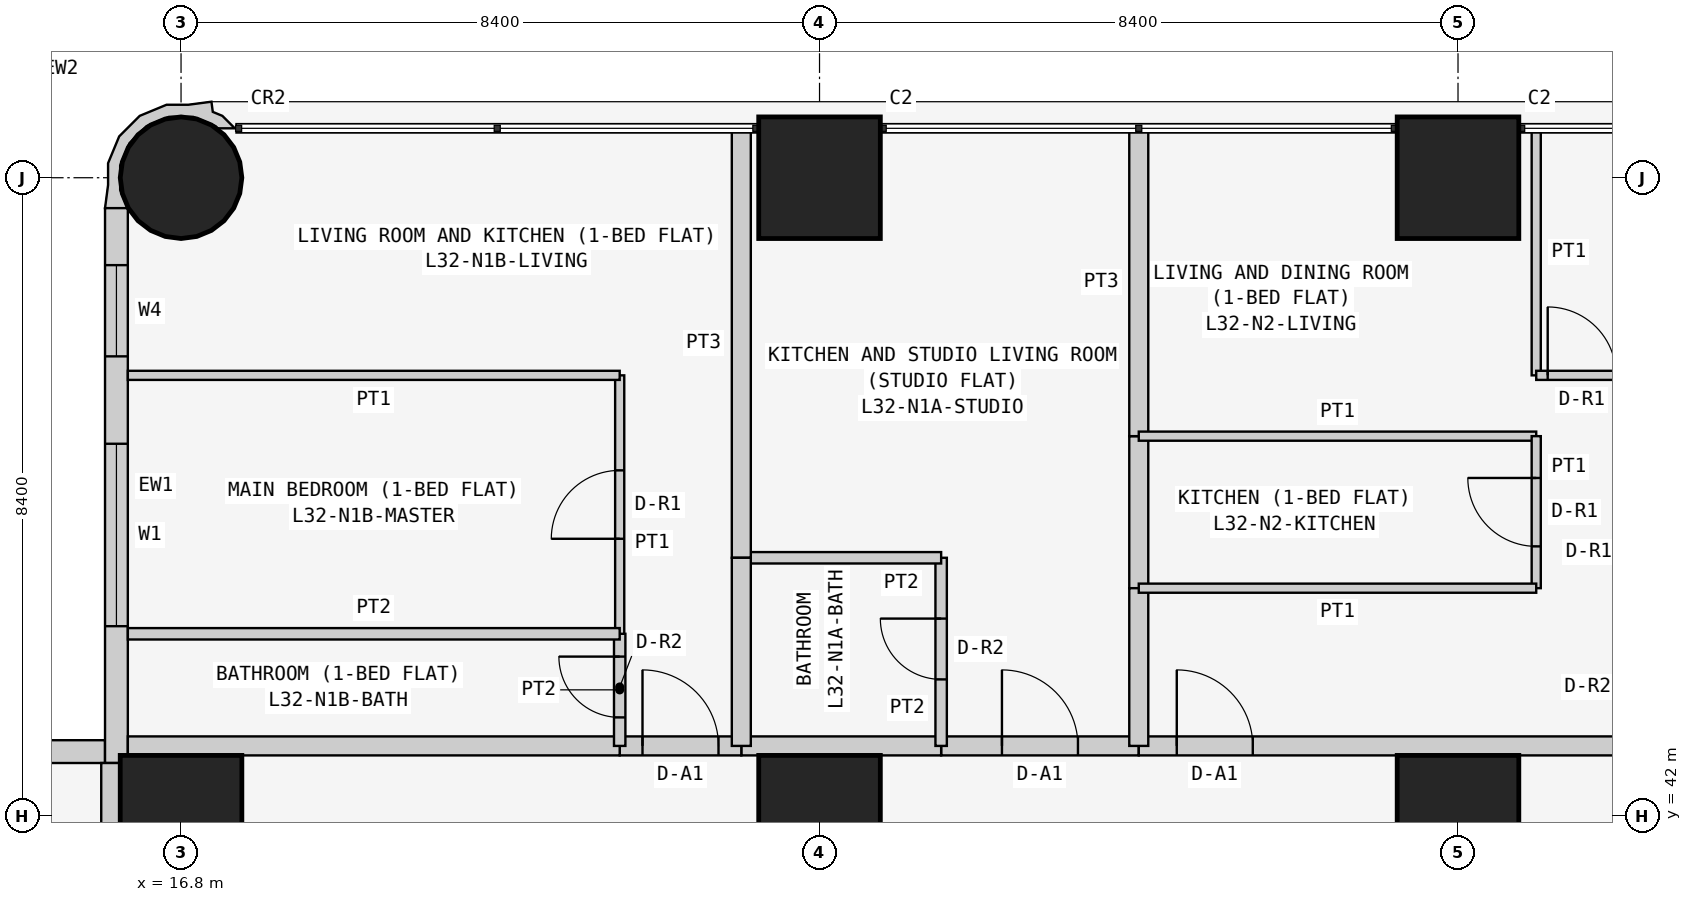
"""IFC4 building model, lengths in metres.
Left out: names, types, materials, properties, quantities, classifications, styles, units other than length and angle.
Written with IfcOpenShell. Run it as: python <this file> out.ifc"""

import sys

from ifc_helpers import new_model, si_unit, direction, frame, frame_2d, origin, origin_2d, place, context, subcontext, project, spatial, polyline, rectangle, circle, outline, extrude, element, fill, save


model = new_model("IFC4")
c1 = context("Model", 3, precision=1e-05, world=origin(), true_north=direction((0.0, 1.0)))
c2 = subcontext(c1, "Body", "Model", "MODEL_VIEW")
j1 = project(units=[si_unit("LENGTHUNIT", "METRE"), si_unit("PLANEANGLEUNIT", "RADIAN")], contexts=[c1])
p1 = place(None, origin())
s1 = spatial("IfcSite", under=j1, at=p1, CompositionType="ELEMENT")
p2 = place(p1, origin())
s2 = spatial("IfcBuilding", under=s1, at=p2, CompositionType="ELEMENT")
p3 = place(p2, frame((0.0, 0.0, 126.9)))
s3 = spatial("IfcBuildingStorey", under=s2, at=p3, CompositionType="ELEMENT", Elevation=126.9)
p4 = place(p3, frame((16.8, 42.0, 0.0), z_axis=(0.0, 0.0, 1.0), x_axis=(1.0, 0.0, 0.0)))
e1 = element("IfcColumn", 1, at=p4, inside=s3, PredefinedType="COLUMN", context=c2, shape_type="SweptSolid", body=[
    extrude(rectangle(XDim=1.6, YDim=1.6, at=origin_2d()), origin(), (0.0, 0.0, 1.0), 3.6),
])
p5 = place(p3, frame((16.8, 50.4, 0.0), z_axis=(0.0, 0.0, 1.0), x_axis=(1.0, 0.0, 0.0)))
e2 = element("IfcColumn", 2, at=p5, inside=s3, PredefinedType="COLUMN", context=c2, shape_type="SweptSolid", body=[
    extrude(circle(Radius=0.8, at=origin_2d()), origin(), (0.0, 0.0, 1.0), 3.6),
])
for number, where, z_axis, x_axis in (
    (3, (25.2, 42.0, 0.0), (0.0, 0.0, 1.0), (1.0, 0.0, 0.0)),
    (4, (25.2, 50.4, 0.0), (0.0, 0.0, 1.0), (1.0, 0.0, 0.0)),
    (5, (33.6, 42.0, 0.0), (0.0, 0.0, 1.0), (1.0, 0.0, 0.0)),
    (6, (33.6, 50.4, 0.0), (0.0, 0.0, 1.0), (1.0, 0.0, 0.0)),
):
    element("IfcColumn", number, at=place(p3, frame(where, z_axis=z_axis, x_axis=x_axis)), inside=s3, PredefinedType="COLUMN", context=c2, shape_type="SweptSolid", body=[
        extrude(rectangle(XDim=1.6, YDim=1.6, at=origin_2d()), origin(), (0.0, 0.0, 1.0), 3.6),
    ])
p6 = place(p3, frame((15.8, 42.85, 0.0), z_axis=(0.0, 0.0, 1.0), x_axis=(-1.0, 0.0, 0.0)))
e7 = element("IfcWall", 7, at=p6, inside=s3, PredefinedType="SOLIDWALL", context=c2, shape_type="SweptSolid", body=[
    extrude(rectangle(XDim=15.4, YDim=0.3, at=frame_2d((7.7, 0.0))), origin(), (0.0, 0.0, 1.0), 3.45),
])
p7 = place(p6, frame((1.2, 0.0, 0.9)))
e8 = element("IfcOpeningElement", 8, at=p7, cuts=e7, PredefinedType="OPENING", context=c2, shape_type="SweptSolid", body=[
    extrude(rectangle(XDim=1.8, YDim=1.5, at=frame_2d((0.9, 0.75))), frame((0.0, 0.16, 0.0), z_axis=(0.0, -1.0, 0.0), x_axis=(1.0, 0.0, 0.0)), (0.0, 0.0, 1.0), 0.32),
])
p8 = place(p6, frame((4.95, 0.0, 1.5)))
e9 = element("IfcOpeningElement", 9, at=p8, cuts=e7, PredefinedType="OPENING", context=c2, shape_type="SweptSolid", body=[
    extrude(rectangle(XDim=0.9, YDim=0.7, at=frame_2d((0.45, 0.35))), frame((0.0, 0.16, 0.0), z_axis=(0.0, -1.0, 0.0), x_axis=(1.0, 0.0, 0.0)), (0.0, 0.0, 1.0), 0.32),
])
p9 = place(p6, frame((8.5, 0.0, 0.9)))
e10 = element("IfcOpeningElement", 10, at=p9, cuts=e7, PredefinedType="OPENING", context=c2, shape_type="SweptSolid", body=[
    extrude(rectangle(XDim=1.8, YDim=1.5, at=frame_2d((0.9, 0.75))), frame((0.0, 0.16, 0.0), z_axis=(0.0, -1.0, 0.0), x_axis=(1.0, 0.0, 0.0)), (0.0, 0.0, 1.0), 0.32),
])
p10 = place(p6, frame((12.5, 0.0, 0.0)))
e11 = element("IfcOpeningElement", 11, at=p10, cuts=e7, PredefinedType="OPENING", context=c2, shape_type="SweptSolid", body=[
    extrude(rectangle(XDim=0.9, YDim=2.4, at=frame_2d((0.45, 1.2))), frame((0.0, 0.16, 0.0), z_axis=(0.0, -1.0, 0.0), x_axis=(1.0, 0.0, 0.0)), (0.0, 0.0, 1.0), 0.32),
])
p11 = place(p6, frame((13.5, 0.0, 0.9)))
e12 = element("IfcOpeningElement", 12, at=p11, cuts=e7, PredefinedType="OPENING", context=c2, shape_type="SweptSolid", body=[
    extrude(rectangle(XDim=1.2, YDim=1.5, at=frame_2d((0.6, 0.75))), frame((0.0, 0.16, 0.0), z_axis=(0.0, -1.0, 0.0), x_axis=(1.0, 0.0, 0.0)), (0.0, 0.0, 1.0), 0.32),
])
p12 = place(p3, frame((15.95, 50.0, 0.0), z_axis=(0.0, 0.0, 1.0), x_axis=(0.0, -1.0, 0.0)))
e13 = element("IfcWall", 13, at=p12, inside=s3, PredefinedType="SOLIDWALL", context=c2, shape_type="SweptSolid", body=[
    extrude(rectangle(XDim=7.3, YDim=0.3, at=frame_2d((3.65, 0.0))), origin(), (0.0, 0.0, 1.0), 3.45),
])
p13 = place(p12, frame((3.1, 0.0, 0.9)))
e14 = element("IfcOpeningElement", 14, at=p13, cuts=e13, PredefinedType="OPENING", context=c2, shape_type="SweptSolid", body=[
    extrude(rectangle(XDim=2.4, YDim=1.5, at=frame_2d((1.2, 0.75))), frame((0.0, 0.16, 0.0), z_axis=(0.0, -1.0, 0.0), x_axis=(1.0, 0.0, 0.0)), (0.0, 0.0, 1.0), 0.32),
])
p14 = place(p12, frame((0.75, 0.0, 0.9)))
e15 = element("IfcOpeningElement", 15, at=p14, cuts=e13, PredefinedType="OPENING", context=c2, shape_type="SweptSolid", body=[
    extrude(rectangle(XDim=1.2, YDim=1.5, at=frame_2d((0.6, 0.75))), frame((0.0, 0.16, 0.0), z_axis=(0.0, -1.0, 0.0), x_axis=(1.0, 0.0, 0.0)), (0.0, 0.0, 1.0), 0.32),
])
p15 = place(p3, frame((17.448, 50.995, 0.0), z_axis=(0.0, 0.0, 1.0), x_axis=(-0.343276641956, 0.93923434088, 0.0)))
e16 = element("IfcWall", 16, at=p15, inside=s3, PredefinedType="SOLIDWALL", context=c2, shape_type="SweptSolid", body=[
    extrude(outline(polyline([(0.241, 0.023), (0.333, 0.124), (0.465, 0.094), (0.532, 0.393), (0.631, 0.663), (0.614, 1.045), (0.454, 1.391), (0.172, 1.649), (-0.098, 1.748), (-0.369, 1.89), (-0.509, 1.621), (-0.491, 1.615), (-0.479, 1.609), (-0.211, 1.62), (0.088, 1.511), (0.323, 1.295), (0.457, 1.006), (0.47, 0.688), (0.361, 0.389), (0.145, 0.154), (0.108, 0.137), (0.031, -0.075), (0.241, 0.023)])), origin(), (0.0, 0.0, 1.0), 3.45),
])
p16 = place(p3, frame((26.8, 42.925, 0.0), z_axis=(0.0, 0.0, 1.0), x_axis=(1.0, 0.0, 0.0)))
e17 = element("IfcWall", 17, at=p16, inside=s3, PredefinedType="PARTITIONING", context=c2, shape_type="SweptSolid", body=[
    extrude(rectangle(XDim=2.6, YDim=0.25, at=frame_2d((1.3, 0.0))), origin(), (0.0, 0.0, 1.0), 3.45),
])
p17 = place(p16, frame((0.8, 0.0, 0.0)))
e18 = element("IfcOpeningElement", 18, at=p17, cuts=e17, PredefinedType="OPENING", context=c2, shape_type="SweptSolid", body=[
    extrude(rectangle(XDim=1.0, YDim=2.1, at=frame_2d((0.5, 1.05))), frame((0.0, 0.135, 0.0), z_axis=(0.0, -1.0, 0.0), x_axis=(1.0, 0.0, 0.0)), (0.0, 0.0, 1.0), 0.27),
])
p18 = place(p3, frame((24.171, 42.925, 0.0), z_axis=(0.0, 0.0, 1.0), x_axis=(1.0, 0.0, 0.0)))
e19 = element("IfcWall", 19, at=p18, inside=s3, PredefinedType="PARTITIONING", context=c2, shape_type="SweptSolid", body=[
    extrude(rectangle(XDim=2.629, YDim=0.25, at=frame_2d((1.314, 0.0))), origin(), (0.0, 0.0, 1.0), 3.45),
])
p19 = place(p3, frame((22.571, 42.925, 0.0), z_axis=(0.0, 0.0, 1.0), x_axis=(1.0, 0.0, 0.0)))
e20 = element("IfcWall", 20, at=p19, inside=s3, PredefinedType="PARTITIONING", context=c2, shape_type="SweptSolid", body=[
    extrude(rectangle(XDim=1.6, YDim=0.25, at=frame_2d((0.8, 0.0))), origin(), (0.0, 0.0, 1.0), 3.45),
])
p20 = place(p19, frame((0.3, 0.0, 0.0)))
e21 = element("IfcOpeningElement", 21, at=p20, cuts=e20, PredefinedType="OPENING", context=c2, shape_type="SweptSolid", body=[
    extrude(rectangle(XDim=1.0, YDim=2.1, at=frame_2d((0.5, 1.05))), frame((0.0, 0.135, 0.0), z_axis=(0.0, -1.0, 0.0), x_axis=(1.0, 0.0, 0.0)), (0.0, 0.0, 1.0), 0.27),
])
p21 = place(p3, frame((16.1, 42.925, 0.0), z_axis=(0.0, 0.0, 1.0), x_axis=(1.0, 0.0, 0.0)))
e22 = element("IfcWall", 22, at=p21, inside=s3, PredefinedType="PARTITIONING", context=c2, shape_type="SweptSolid", body=[
    extrude(rectangle(XDim=6.471, YDim=0.25, at=frame_2d((3.235, 0.0))), origin(), (0.0, 0.0, 1.0), 3.45),
])
p22 = place(p3, frame((29.4, 42.925, 0.0), z_axis=(0.0, 0.0, 1.0), x_axis=(1.0, 0.0, 0.0)))
e23 = element("IfcWall", 23, at=p22, inside=s3, PredefinedType="PARTITIONING", context=c2, shape_type="SweptSolid", body=[
    extrude(rectangle(XDim=6.429, YDim=0.25, at=frame_2d((3.215, 0.0))), origin(), (0.0, 0.0, 1.0), 3.45),
])
p23 = place(p22, frame((0.5, 0.0, 0.0)))
e24 = element("IfcOpeningElement", 24, at=p23, cuts=e23, PredefinedType="OPENING", context=c2, shape_type="SweptSolid", body=[
    extrude(rectangle(XDim=1.0, YDim=2.1, at=frame_2d((0.5, 1.05))), frame((0.0, 0.135, 0.0), z_axis=(0.0, -1.0, 0.0), x_axis=(1.0, 0.0, 0.0)), (0.0, 0.0, 1.0), 0.27),
])
p24 = place(p3, frame((15.875, 36.229, 0.0), z_axis=(0.0, 0.0, 1.0), x_axis=(0.0, 1.0, 0.0)))
e25 = element("IfcWall", 25, at=p24, inside=s3, PredefinedType="PARTITIONING", context=c2, shape_type="SweptSolid", body=[
    extrude(rectangle(XDim=6.471, YDim=0.25, at=frame_2d((3.235, 0.0))), origin(), (0.0, 0.0, 1.0), 3.45),
])
p25 = place(p3, frame((26.8, 42.925, 0.0), z_axis=(0.0, 0.0, 1.0), x_axis=(0.0, 1.0, 0.0)))
e26 = element("IfcWall", 26, at=p25, inside=s3, PredefinedType="PARTITIONING", context=c2, shape_type="SweptSolid", body=[
    extrude(rectangle(XDim=2.475, YDim=0.15, at=frame_2d((1.237, 0.0))), origin(), (0.0, 0.0, 1.0), 3.45),
])
p26 = place(p25, frame((0.875, 0.0, 0.0)))
e27 = element("IfcOpeningElement", 27, at=p26, cuts=e26, PredefinedType="OPENING", context=c2, shape_type="SweptSolid", body=[
    extrude(rectangle(XDim=0.8, YDim=2.1, at=frame_2d((0.4, 1.05))), frame((0.0, 0.085, 0.0), z_axis=(0.0, -1.0, 0.0), x_axis=(1.0, 0.0, 0.0)), (0.0, 0.0, 1.0), 0.17),
])
p27 = place(p3, frame((26.8, 45.4, 0.0), z_axis=(0.0, 0.0, 1.0), x_axis=(-1.0, 0.0, 0.0)))
e28 = element("IfcWall", 28, at=p27, inside=s3, PredefinedType="PARTITIONING", context=c2, shape_type="SweptSolid", body=[
    extrude(rectangle(XDim=2.629, YDim=0.15, at=frame_2d((1.314, 0.0))), origin(), (0.0, 0.0, 1.0), 3.45),
])
p28 = place(p3, frame((24.171, 45.4, 0.0), z_axis=(0.0, 0.0, 1.0), x_axis=(0.0, 1.0, 0.0)))
e29 = element("IfcWall", 29, at=p28, inside=s3, PredefinedType="PARTITIONING", context=c2, shape_type="SweptSolid", body=[
    extrude(rectangle(XDim=5.65, YDim=0.25, at=frame_2d((2.825, 0.0))), origin(), (0.0, 0.0, 1.0), 3.45),
])
p29 = place(p3, frame((29.4, 47.0, 0.0), z_axis=(0.0, 0.0, 1.0), x_axis=(0.0, -1.0, 0.0)))
e30 = element("IfcWall", 30, at=p29, inside=s3, PredefinedType="PARTITIONING", context=c2, shape_type="SweptSolid", body=[
    extrude(rectangle(XDim=2.0, YDim=0.25, at=frame_2d((1.0, 0.0))), origin(), (0.0, 0.0, 1.0), 2.848),
])
p30 = place(p3, frame((29.4, 45.0, 0.0), z_axis=(0.0, 0.0, 1.0), x_axis=(0.0, -1.0, 0.0)))
e31 = element("IfcWall", 31, at=p30, inside=s3, PredefinedType="PARTITIONING", context=c2, shape_type="SweptSolid", body=[
    extrude(rectangle(XDim=2.075, YDim=0.25, at=frame_2d((1.038, 0.0))), origin(), (0.0, 0.0, 1.0), 2.848),
])
p31 = place(p3, frame((29.4, 51.05, 0.0), z_axis=(0.0, 0.0, 1.0), x_axis=(0.0, -1.0, 0.0)))
e32 = element("IfcWall", 32, at=p31, inside=s3, PredefinedType="PARTITIONING", context=c2, shape_type="SweptSolid", body=[
    extrude(rectangle(XDim=4.05, YDim=0.25, at=frame_2d((2.025, 0.0))), origin(), (0.0, 0.0, 1.0), 2.848),
])
p32 = place(p3, frame((24.171, 45.4, 0.0), z_axis=(0.0, 0.0, 1.0), x_axis=(0.0, -1.0, 0.0)))
e33 = element("IfcWall", 33, at=p32, inside=s3, PredefinedType="PARTITIONING", context=c2, shape_type="SweptSolid", body=[
    extrude(rectangle(XDim=2.475, YDim=0.25, at=frame_2d((1.237, 0.0))), origin(), (0.0, 0.0, 1.0), 3.45),
])
p33 = place(p3, frame((22.571, 42.925, 0.0), z_axis=(0.0, 0.0, 1.0), x_axis=(0.0, 1.0, 0.0)))
e34 = element("IfcWall", 34, at=p33, inside=s3, PredefinedType="PARTITIONING", context=c2, shape_type="SweptSolid", body=[
    extrude(rectangle(XDim=1.475, YDim=0.15, at=frame_2d((0.737, 0.0))), origin(), (0.0, 0.0, 1.0), 3.45),
])
p34 = place(p33, frame((0.375, 0.0, 0.0)))
e35 = element("IfcOpeningElement", 35, at=p34, cuts=e34, PredefinedType="OPENING", context=c2, shape_type="SweptSolid", body=[
    extrude(rectangle(XDim=0.8, YDim=2.1, at=frame_2d((0.4, 1.05))), frame((0.0, 0.085, 0.0), z_axis=(0.0, -1.0, 0.0), x_axis=(1.0, 0.0, 0.0)), (0.0, 0.0, 1.0), 0.17),
])
p35 = place(p3, frame((22.571, 44.4, 0.0), z_axis=(0.0, 0.0, 1.0), x_axis=(0.0, 1.0, 0.0)))
e36 = element("IfcWall", 36, at=p35, inside=s3, PredefinedType="PARTITIONING", context=c2, shape_type="SweptSolid", body=[
    extrude(rectangle(XDim=3.4, YDim=0.12, at=frame_2d((1.7, 0.0))), origin(), (0.0, 0.0, 1.0), 3.45),
])
p36 = place(p35, frame((1.25, 0.0, 0.0)))
e37 = element("IfcOpeningElement", 37, at=p36, cuts=e36, PredefinedType="OPENING", context=c2, shape_type="SweptSolid", body=[
    extrude(rectangle(XDim=0.9, YDim=2.1, at=frame_2d((0.45, 1.05))), frame((0.0, 0.07, 0.0), z_axis=(0.0, -1.0, 0.0), x_axis=(1.0, 0.0, 0.0)), (0.0, 0.0, 1.0), 0.14),
])
p37 = place(p3, frame((22.571, 47.8, 0.0), z_axis=(0.0, 0.0, 1.0), x_axis=(-1.0, 0.0, 0.0)))
e38 = element("IfcWall", 38, at=p37, inside=s3, PredefinedType="PARTITIONING", context=c2, shape_type="SweptSolid", body=[
    extrude(rectangle(XDim=6.471, YDim=0.12, at=frame_2d((3.235, 0.0))), origin(), (0.0, 0.0, 1.0), 3.45),
])
p38 = place(p3, frame((22.571, 44.4, 0.0), z_axis=(0.0, 0.0, 1.0), x_axis=(-1.0, 0.0, 0.0)))
e39 = element("IfcWall", 39, at=p38, inside=s3, PredefinedType="PARTITIONING", context=c2, shape_type="SweptSolid", body=[
    extrude(rectangle(XDim=6.471, YDim=0.15, at=frame_2d((3.235, 0.0))), origin(), (0.0, 0.0, 1.0), 3.45),
])
p39 = place(p3, frame((29.4, 47.0, 0.0), z_axis=(0.0, 0.0, 1.0), x_axis=(1.0, 0.0, 0.0)))
e40 = element("IfcWall", 40, at=p39, inside=s3, PredefinedType="PARTITIONING", context=c2, shape_type="SweptSolid", body=[
    extrude(rectangle(XDim=5.229, YDim=0.12, at=frame_2d((2.615, 0.0))), origin(), (0.0, 0.0, 1.0), 3.45),
])
p40 = place(p3, frame((34.629, 47.0, 0.0), z_axis=(0.0, 0.0, 1.0), x_axis=(0.0, -1.0, 0.0)))
e41 = element("IfcWall", 41, at=p40, inside=s3, PredefinedType="PARTITIONING", context=c2, shape_type="SweptSolid", body=[
    extrude(rectangle(XDim=2.0, YDim=0.12, at=frame_2d((1.0, 0.0))), origin(), (0.0, 0.0, 1.0), 3.45),
])
p41 = place(p40, frame((0.55, 0.0, 0.0)))
e42 = element("IfcOpeningElement", 42, at=p41, cuts=e41, PredefinedType="OPENING", context=c2, shape_type="SweptSolid", body=[
    extrude(rectangle(XDim=0.9, YDim=2.1, at=frame_2d((0.45, 1.05))), frame((0.0, 0.07, 0.0), z_axis=(0.0, -1.0, 0.0), x_axis=(1.0, 0.0, 0.0)), (0.0, 0.0, 1.0), 0.14),
])
p42 = place(p3, frame((34.629, 45.0, 0.0), z_axis=(0.0, 0.0, 1.0), x_axis=(-1.0, 0.0, 0.0)))
e43 = element("IfcWall", 43, at=p42, inside=s3, PredefinedType="PARTITIONING", context=c2, shape_type="SweptSolid", body=[
    extrude(rectangle(XDim=5.229, YDim=0.12, at=frame_2d((2.615, 0.0))), origin(), (0.0, 0.0, 1.0), 3.45),
])
p43 = place(p3, frame((34.629, 51.05, 0.0), z_axis=(0.0, 0.0, 1.0), x_axis=(0.0, -1.0, 0.0)))
e44 = element("IfcWall", 44, at=p43, inside=s3, PredefinedType="PARTITIONING", context=c2, shape_type="SweptSolid", body=[
    extrude(rectangle(XDim=3.25, YDim=0.12, at=frame_2d((1.625, 0.0))), origin(), (0.0, 0.0, 1.0), 3.45),
])
p44 = place(p3, frame((34.629, 47.8, 0.0), z_axis=(0.0, 0.0, 1.0), x_axis=(1.0, 0.0, 0.0)))
e45 = element("IfcWall", 45, at=p44, inside=s3, PredefinedType="PARTITIONING", context=c2, shape_type="SweptSolid", body=[
    extrude(rectangle(XDim=1.2, YDim=0.12, at=frame_2d((0.6, 0.0))), origin(), (0.0, 0.0, 1.0), 3.45),
])
p45 = place(p44, frame((0.151, 0.0, 0.0)))
e46 = element("IfcOpeningElement", 46, at=p45, cuts=e45, PredefinedType="OPENING", context=c2, shape_type="SweptSolid", body=[
    extrude(rectangle(XDim=0.9, YDim=2.1, at=frame_2d((0.45, 1.05))), frame((0.0, 0.07, 0.0), z_axis=(0.0, -1.0, 0.0), x_axis=(1.0, 0.0, 0.0)), (0.0, 0.0, 1.0), 0.14),
])
p46 = place(p13, origin())
e47 = element("IfcWindow", 47, at=p46, inside=s3, PartitioningType="SINGLE_PANEL", PredefinedType="WINDOW", context=c2, shape_type="SweptSolid", body=[
    extrude(rectangle(XDim=2.4, YDim=1.5, at=frame_2d((1.2, 0.75))), frame((0.0, 0.03, 0.0), z_axis=(0.0, -1.0, 0.0), x_axis=(1.0, 0.0, 0.0)), (0.0, 0.0, 1.0), 0.06),
])
fill(e14, e47)
p47 = place(p14, origin())
e48 = element("IfcWindow", 48, at=p47, inside=s3, PartitioningType="SINGLE_PANEL", PredefinedType="WINDOW", context=c2, shape_type="SweptSolid", body=[
    extrude(rectangle(XDim=1.2, YDim=1.5, at=frame_2d((0.6, 0.75))), frame((0.0, 0.03, 0.0), z_axis=(0.0, -1.0, 0.0), x_axis=(1.0, 0.0, 0.0)), (0.0, 0.0, 1.0), 0.06),
])
fill(e15, e48)
p48 = place(p17, origin())
e49 = element("IfcDoor", 49, at=p48, inside=s3, OperationType="SINGLE_SWING_LEFT", PredefinedType="DOOR", context=c2, shape_type="SweptSolid", body=[
    extrude(rectangle(XDim=1.0, YDim=2.1, at=frame_2d((0.5, 1.05))), frame((0.0, 0.025, 0.0), z_axis=(0.0, -1.0, 0.0), x_axis=(1.0, 0.0, 0.0)), (0.0, 0.0, 1.0), 0.05),
])
fill(e18, e49)
p49 = place(p26, origin())
e50 = element("IfcDoor", 50, at=p49, inside=s3, OperationType="SINGLE_SWING_RIGHT", PredefinedType="DOOR", context=c2, shape_type="SweptSolid", body=[
    extrude(rectangle(XDim=0.8, YDim=2.1, at=frame_2d((0.4, 1.05))), frame((0.0, 0.025, 0.0), z_axis=(0.0, -1.0, 0.0), x_axis=(1.0, 0.0, 0.0)), (0.0, 0.0, 1.0), 0.05),
])
fill(e27, e50)
p50 = place(p20, origin())
e51 = element("IfcDoor", 51, at=p50, inside=s3, OperationType="SINGLE_SWING_LEFT", PredefinedType="DOOR", context=c2, shape_type="SweptSolid", body=[
    extrude(rectangle(XDim=1.0, YDim=2.1, at=frame_2d((0.5, 1.05))), frame((0.0, 0.025, 0.0), z_axis=(0.0, -1.0, 0.0), x_axis=(1.0, 0.0, 0.0)), (0.0, 0.0, 1.0), 0.05),
])
fill(e21, e51)
p51 = place(p34, origin())
e52 = element("IfcDoor", 52, at=p51, inside=s3, OperationType="SINGLE_SWING_RIGHT", PredefinedType="DOOR", context=c2, shape_type="SweptSolid", body=[
    extrude(rectangle(XDim=0.8, YDim=2.1, at=frame_2d((0.4, 1.05))), frame((0.0, 0.025, 0.0), z_axis=(0.0, -1.0, 0.0), x_axis=(1.0, 0.0, 0.0)), (0.0, 0.0, 1.0), 0.05),
])
fill(e35, e52)
p52 = place(p36, origin())
e53 = element("IfcDoor", 53, at=p52, inside=s3, OperationType="SINGLE_SWING_LEFT", PredefinedType="DOOR", context=c2, shape_type="SweptSolid", body=[
    extrude(rectangle(XDim=0.9, YDim=2.1, at=frame_2d((0.45, 1.05))), frame((0.0, 0.025, 0.0), z_axis=(0.0, -1.0, 0.0), x_axis=(1.0, 0.0, 0.0)), (0.0, 0.0, 1.0), 0.05),
])
fill(e37, e53)
p53 = place(p23, origin())
e54 = element("IfcDoor", 54, at=p53, inside=s3, OperationType="SINGLE_SWING_LEFT", PredefinedType="DOOR", context=c2, shape_type="SweptSolid", body=[
    extrude(rectangle(XDim=1.0, YDim=2.1, at=frame_2d((0.5, 1.05))), frame((0.0, 0.025, 0.0), z_axis=(0.0, -1.0, 0.0), x_axis=(1.0, 0.0, 0.0)), (0.0, 0.0, 1.0), 0.05),
])
fill(e24, e54)
p54 = place(p41, frame((0.9, 0.0, 0.0), z_axis=(0.0, 0.0, 1.0), x_axis=(-1.0, 0.0, 0.0)))
e55 = element("IfcDoor", 55, at=p54, inside=s3, OperationType="SINGLE_SWING_RIGHT", PredefinedType="DOOR", context=c2, shape_type="SweptSolid", body=[
    extrude(rectangle(XDim=0.9, YDim=2.1, at=frame_2d((0.45, 1.05))), frame((0.0, 0.025, 0.0), z_axis=(0.0, -1.0, 0.0), x_axis=(1.0, 0.0, 0.0)), (0.0, 0.0, 1.0), 0.05),
])
fill(e42, e55)
p55 = place(p45, origin())
e56 = element("IfcDoor", 56, at=p55, inside=s3, OperationType="SINGLE_SWING_LEFT", PredefinedType="DOOR", context=c2, shape_type="SweptSolid", body=[
    extrude(rectangle(XDim=0.9, YDim=2.1, at=frame_2d((0.45, 1.05))), frame((0.0, 0.025, 0.0), z_axis=(0.0, -1.0, 0.0), x_axis=(1.0, 0.0, 0.0)), (0.0, 0.0, 1.0), 0.05),
])
fill(e46, e56)
save(model, sys.argv[1])
